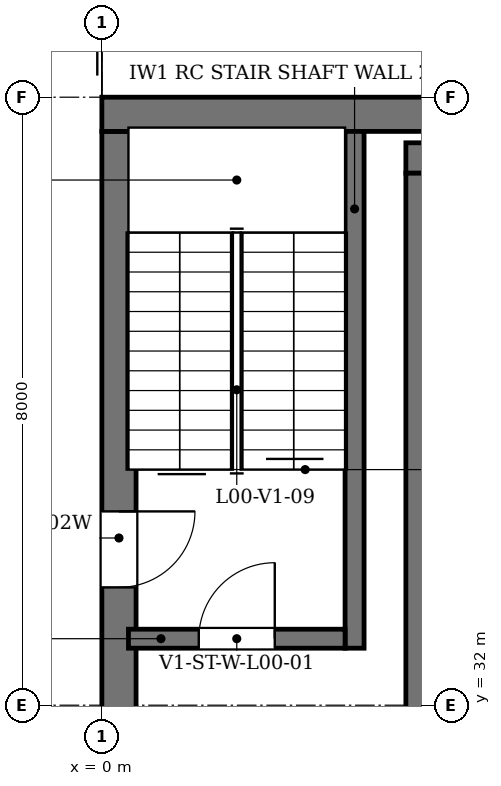
"""IFC4 building model, lengths in metres.
Left out: names, types, materials, properties, quantities, classifications, styles, units other than length and angle.
Written with IfcOpenShell. Run it as: python <this file> out.ifc"""

import sys

from ifc_helpers import new_model, si_unit, direction, frame, frame_2d, origin, place, context, subcontext, project, spatial, rectangle, extrude, element, fill, save


model = new_model("IFC4")
c1 = context("Model", 3, precision=1e-05, world=origin(), true_north=direction((0.0, 1.0)))
c2 = subcontext(c1, "Body", "Model", "MODEL_VIEW")
j1 = project(units=[si_unit("LENGTHUNIT", "METRE"), si_unit("PLANEANGLEUNIT", "RADIAN")], contexts=[c1])
p1 = place(None, origin())
s1 = spatial("IfcSite", under=j1, at=p1, CompositionType="ELEMENT")
p2 = place(p1, origin())
s2 = spatial("IfcBuilding", under=s1, at=p2, CompositionType="ELEMENT")
p3 = place(p2, origin())
s3 = spatial("IfcBuildingStorey", under=s2, at=p3, CompositionType="ELEMENT", Elevation=0.0)
p4 = place(p3, frame((4.0, 39.2, 0.0), z_axis=(0.0, 0.0, 1.0), x_axis=(1.0, 0.0, 0.0)))
e1 = element("IfcWall", 1, at=p4, inside=s3, PredefinedType="SHEAR", context=c2, shape_type="SweptSolid", body=[
    extrude(rectangle(XDim=24.0, YDim=0.4, at=frame_2d((12.0, 0.0))), origin(), (0.0, 0.0, 1.0), 4.55),
])
p5 = place(p3, frame((4.2, 16.4, 0.0), z_axis=(0.0, 0.0, 1.0), x_axis=(0.0, 1.0, 0.0)))
e2 = element("IfcWall", 2, at=p5, inside=s3, PredefinedType="SHEAR", context=c2, shape_type="SweptSolid", body=[
    extrude(rectangle(XDim=22.6, YDim=0.4, at=frame_2d((11.3, 0.0))), origin(), (0.0, 0.0, 1.0), 4.55),
])
p6 = place(p3, frame((0.225, -1.55, 0.0), z_axis=(0.0, 0.0, 1.0), x_axis=(0.0, 1.0, 0.0)))
e3 = element("IfcWall", 3, at=p6, inside=s3, PredefinedType="SOLIDWALL", context=c2, shape_type="SweptSolid", body=[
    extrude(rectangle(XDim=41.1, YDim=0.45, at=frame_2d((20.55, 0.0))), origin(), (0.0, 0.0, 1.0), 4.8),
])
p7 = place(p6, frame((35.1, 0.0, 0.0)))
e4 = element("IfcOpeningElement", 4, at=p7, cuts=e3, PredefinedType="OPENING", context=c2, shape_type="SweptSolid", body=[
    extrude(rectangle(XDim=1.0, YDim=2.1, at=frame_2d((0.5, 1.05))), frame((0.0, 0.235, 0.0), z_axis=(0.0, -1.0, 0.0), x_axis=(1.0, 0.0, 0.0)), (0.0, 0.0, 1.0), 0.47),
])
p8 = place(p3, frame((0.0, 39.775, 0.0), z_axis=(0.0, 0.0, 1.0), x_axis=(1.0, 0.0, 0.0)))
e5 = element("IfcWall", 5, at=p8, inside=s3, PredefinedType="SOLIDWALL", context=c2, shape_type="SweptSolid", body=[
    extrude(rectangle(XDim=32.0, YDim=0.45, at=frame_2d((16.0, 0.0))), origin(), (0.0, 0.0, 1.0), 4.8),
])
p9 = place(p3, frame((3.325, 32.75, 0.0), z_axis=(0.0, 0.0, 1.0), x_axis=(0.0, 1.0, 0.0)))
e6 = element("IfcWall", 6, at=p9, inside=s3, PredefinedType="SOLIDWALL", context=c2, shape_type="SweptSolid", body=[
    extrude(rectangle(XDim=6.8, YDim=0.25, at=frame_2d((3.4, 0.0))), origin(), (0.0, 0.0, 1.0), 4.8),
])
p10 = place(p3, frame((0.35, 32.875, 0.0), z_axis=(0.0, 0.0, 1.0), x_axis=(1.0, 0.0, 0.0)))
e7 = element("IfcWall", 7, at=p10, inside=s3, PredefinedType="SOLIDWALL", context=c2, shape_type="SweptSolid", body=[
    extrude(rectangle(XDim=2.85, YDim=0.25, at=frame_2d((1.425, 0.0))), origin(), (0.0, 0.0, 1.0), 4.8),
])
p11 = place(p10, frame((0.925, 0.0, 0.0)))
e8 = element("IfcOpeningElement", 8, at=p11, cuts=e7, PredefinedType="OPENING", context=c2, shape_type="SweptSolid", body=[
    extrude(rectangle(XDim=1.0, YDim=2.1, at=frame_2d((0.5, 1.05))), frame((0.0, 0.135, 0.0), z_axis=(0.0, -1.0, 0.0), x_axis=(1.0, 0.0, 0.0)), (0.0, 0.0, 1.0), 0.27),
])
p12 = place(p11, frame((1.0, 0.0, 0.0), z_axis=(0.0, 0.0, 1.0), x_axis=(-1.0, 0.0, 0.0)))
e9 = element("IfcDoor", 9, at=p12, inside=s3, OperationType="SINGLE_SWING_RIGHT", PredefinedType="DOOR", context=c2, shape_type="SweptSolid", body=[
    extrude(rectangle(XDim=1.0, YDim=2.1, at=frame_2d((0.5, 1.05))), frame((0.0, 0.025, 0.0), z_axis=(0.0, -1.0, 0.0), x_axis=(1.0, 0.0, 0.0)), (0.0, 0.0, 1.0), 0.05),
])
fill(e8, e9)
p13 = place(p7, origin())
e10 = element("IfcDoor", 10, at=p13, inside=s3, OperationType="SINGLE_SWING_RIGHT", PredefinedType="DOOR", context=c2, shape_type="SweptSolid", body=[
    extrude(rectangle(XDim=1.0, YDim=2.1, at=frame_2d((0.5, 1.05))), frame((0.0, 0.025, 0.0), z_axis=(0.0, -1.0, 0.0), x_axis=(1.0, 0.0, 0.0)), (0.0, 0.0, 1.0), 0.05),
])
fill(e4, e10)
save(model, sys.argv[1])
